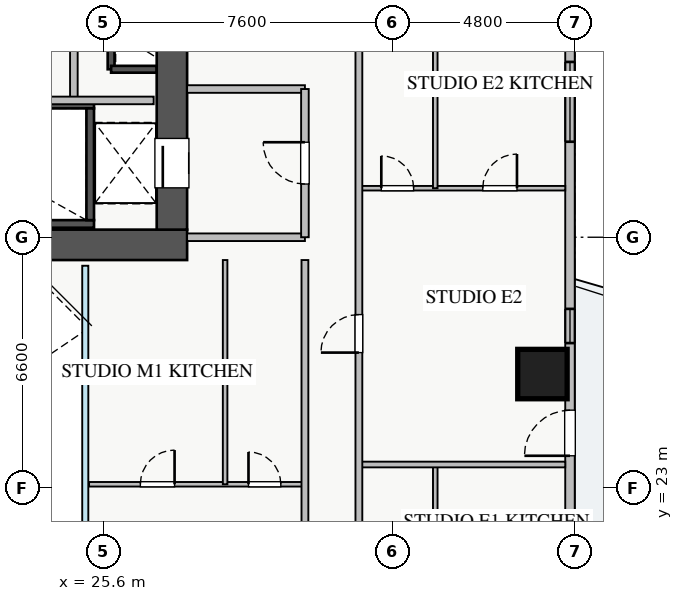
"""IFC4 building model, lengths in metres.
Left out: names, types, materials, properties, quantities, classifications, styles, units other than length and angle.
Written with IfcOpenShell. Run it as: python <this file> out.ifc"""

import sys

from ifc_helpers import new_model, si_unit, direction, frame, frame_2d, origin, origin_2d, place, context, subcontext, project, spatial, rectangle, extrude, source, transform, mapped, element, fill, save


model = new_model("IFC4")
c1 = context("Model", 3, precision=1e-05, world=origin(), true_north=direction((0.0, 1.0)))
c2 = subcontext(c1, "Body", "Model", "MODEL_VIEW")
j1 = project(units=[si_unit("LENGTHUNIT", "METRE"), si_unit("PLANEANGLEUNIT", "RADIAN")], contexts=[c1])
p1 = place(None, origin())
s1 = spatial("IfcSite", under=j1, at=p1, CompositionType="ELEMENT")
p2 = place(p1, origin())
s2 = spatial("IfcBuilding", under=s1, at=p2, CompositionType="ELEMENT")
p3 = place(p2, frame((0.0, 0.0, 69.75)))
s3 = spatial("IfcBuildingStorey", under=s2, at=p3, CompositionType="ELEMENT", Elevation=69.75)
p4 = place(p3, frame((25.8, 34.02, 0.0), z_axis=(0.0, 0.0, 1.0), x_axis=(0.0, 1.0, 0.0)))
e1 = element("IfcWall", 1, at=p4, inside=s3, PredefinedType="SHEAR", context=c2, shape_type="SweptSolid", body=[
    extrude(rectangle(XDim=1.06, YDim=0.18, at=frame_2d((0.53, 0.0))), origin(), (0.0, 0.0, 1.0), 3.07),
])
p5 = place(p3, frame((25.8, 34.02, 0.0), z_axis=(0.0, 0.0, 1.0), x_axis=(1.0, 0.0, 0.0)))
e2 = element("IfcWall", 2, at=p5, inside=s3, PredefinedType="SHEAR", context=c2, shape_type="SweptSolid", body=[
    extrude(rectangle(XDim=1.2, YDim=0.18, at=frame_2d((0.6, 0.0))), origin(), (0.0, 0.0, 1.0), 3.07),
])
p6 = place(p3, frame((18.2, 29.95, 0.0), z_axis=(0.0, 0.0, 1.0), x_axis=(1.0, 0.0, 0.0)))
e3 = element("IfcWall", 3, at=p6, inside=s3, PredefinedType="SHEAR", context=c2, shape_type="SweptSolid", body=[
    extrude(rectangle(XDim=7.15, YDim=0.2, at=frame_2d((3.575, 0.0))), origin(), (0.0, 0.0, 1.0), 3.25),
])
p7 = place(p3, frame((18.2, 33.09, 0.0), z_axis=(0.0, 0.0, 1.0), x_axis=(1.0, 0.0, 0.0)))
e4 = element("IfcWall", 4, at=p7, inside=s3, PredefinedType="SHEAR", context=c2, shape_type="SweptSolid", body=[
    extrude(rectangle(XDim=7.15, YDim=0.2, at=frame_2d((3.575, 0.0))), origin(), (0.0, 0.0, 1.0), 3.25),
])
p8 = place(p7, frame((0.35, 0.0, 0.0)))
e5 = element("IfcOpeningElement", 5, at=p8, cuts=e4, PredefinedType="OPENING", context=c2, shape_type="SweptSolid", body=[
    extrude(rectangle(XDim=1.1, YDim=2.05, at=frame_2d((0.55, 1.025))), frame((0.0, 0.11, 0.0), z_axis=(0.0, -1.0, 0.0), x_axis=(1.0, 0.0, 0.0)), (0.0, 0.0, 1.0), 0.22),
])
p9 = place(p3, frame((25.25, 30.05, 0.0), z_axis=(0.0, 0.0, 1.0), x_axis=(0.0, 1.0, 0.0)))
e6 = element("IfcWall", 6, at=p9, inside=s3, PredefinedType="SHEAR", context=c2, shape_type="SweptSolid", body=[
    extrude(rectangle(XDim=2.94, YDim=0.2, at=frame_2d((1.47, 0.0))), origin(), (0.0, 0.0, 1.0), 3.25),
])
p10 = place(p3, frame((10.2, 29.4, 0.0), z_axis=(0.0, 0.0, 1.0), x_axis=(1.0, 0.0, 0.0)))
e7 = element("IfcWall", 7, at=p10, inside=s3, PredefinedType="SHEAR", context=c2, shape_type="SweptSolid", body=[
    extrude(rectangle(XDim=17.6, YDim=0.8, at=frame_2d((8.8, 0.0))), origin(), (0.0, 0.0, 1.0), 3.25),
])
p11 = place(p3, frame((27.4, 29.8, 0.0), z_axis=(0.0, 0.0, 1.0), x_axis=(0.0, 1.0, 0.0)))
e8 = element("IfcWall", 8, at=p11, inside=s3, PredefinedType="SHEAR", context=c2, shape_type="SweptSolid", body=[
    extrude(rectangle(XDim=5.6, YDim=0.8, at=frame_2d((2.8, 0.0))), origin(), (0.0, 0.0, 1.0), 3.25),
])
p12 = place(p11, frame((1.1, 0.0, 0.0)))
e9 = element("IfcOpeningElement", 9, at=p12, cuts=e8, PredefinedType="OPENING", context=c2, shape_type="SweptSolid", body=[
    extrude(rectangle(XDim=1.3, YDim=2.05, at=frame_2d((0.65, 1.025))), frame((0.0, 0.41, 0.0), z_axis=(0.0, -1.0, 0.0), x_axis=(1.0, 0.0, 0.0)), (0.0, 0.0, 1.0), 0.82),
])
m1 = source(origin(), c2, "Body", "SweptSolid", [
    extrude(rectangle(XDim=1.3, YDim=1.3, at=origin_2d()), origin(), (0.0, 0.0, 1.0), 3.25),
])
p13 = place(p3, frame((37.15, 26.0, 0.0), z_axis=(0.0, 0.0, 1.0), x_axis=(1.0, 0.0, 0.0)))
e10 = element("IfcColumn", 10, at=p13, inside=s3, PredefinedType="COLUMN", context=c2, shape_type="MappedRepresentation", body=[
    mapped(m1, transform((0.0, 0.0, 0.0), x_axis=(1.0, 0.0, 0.0), y_axis=(0.0, 1.0, 0.0), z_axis=(0.0, 0.0, 1.0), scale=1.0)),
])
p14 = place(p3, frame((37.875, 9.45, 0.0), z_axis=(0.0, 0.0, 1.0), x_axis=(0.0, 1.0, 0.0)))
e11 = element("IfcWall", 11, at=p14, inside=s3, PredefinedType="STANDARD", context=c2, shape_type="SweptSolid", body=[
    extrude(rectangle(XDim=27.1, YDim=0.25, at=frame_2d((13.55, 0.0))), origin(), (0.0, 0.0, 1.0), 2.61),
])
p15 = place(p14, frame((14.4, 0.0, 0.0)))
e12 = element("IfcOpeningElement", 12, at=p15, cuts=e11, PredefinedType="OPENING", context=c2, shape_type="SweptSolid", body=[
    extrude(rectangle(XDim=1.2, YDim=2.1, at=frame_2d((0.6, 1.05))), frame((0.0, 0.135, 0.0), z_axis=(0.0, -1.0, 0.0), x_axis=(1.0, 0.0, 0.0)), (0.0, 0.0, 1.0), 0.27),
])
p16 = place(p14, frame((2.188, 0.0, 0.9)))
e13 = element("IfcOpeningElement", 13, at=p16, cuts=e11, PredefinedType="OPENING", context=c2, shape_type="SweptSolid", body=[
    extrude(rectangle(XDim=2.4, YDim=1.48, at=frame_2d((1.2, 0.74))), frame((0.0, 0.135, 0.0), z_axis=(0.0, -1.0, 0.0), x_axis=(1.0, 0.0, 0.0)), (0.0, 0.0, 1.0), 0.27),
])
p17 = place(p14, frame((22.663, 0.0, 0.9)))
e14 = element("IfcOpeningElement", 14, at=p17, cuts=e11, PredefinedType="OPENING", context=c2, shape_type="SweptSolid", body=[
    extrude(rectangle(XDim=2.1, YDim=1.48, at=frame_2d((1.05, 0.74))), frame((0.0, 0.135, 0.0), z_axis=(0.0, -1.0, 0.0), x_axis=(1.0, 0.0, 0.0)), (0.0, 0.0, 1.0), 0.27),
])
p18 = place(p14, frame((17.365, 0.0, 0.9)))
e15 = element("IfcOpeningElement", 15, at=p18, cuts=e11, PredefinedType="OPENING", context=c2, shape_type="SweptSolid", body=[
    extrude(rectangle(XDim=0.9, YDim=1.2, at=frame_2d((0.45, 0.6))), frame((0.0, 0.135, 0.0), z_axis=(0.0, -1.0, 0.0), x_axis=(1.0, 0.0, 0.0)), (0.0, 0.0, 1.0), 0.27),
])
for number, where, z_axis, x_axis in (
    (16, (27.8, 29.6, 0.0), (0.0, 0.0, 1.0), (1.0, 0.0, 0.0)),
    (17, (27.8, 33.5, 0.0), (0.0, 0.0, 1.0), (1.0, 0.0, 0.0)),
):
    element("IfcWall", number, at=place(p3, frame(where, z_axis=z_axis, x_axis=x_axis)), inside=s3, PredefinedType="PARTITIONING", context=c2, shape_type="SweptSolid", body=[
        extrude(rectangle(XDim=3.1, YDim=0.2, at=frame_2d((1.55, 0.0))), origin(), (0.0, 0.0, 1.0), 3.07),
    ])
p19 = place(p3, frame((30.9, 29.6, 0.0), z_axis=(0.0, 0.0, 1.0), x_axis=(0.0, 1.0, 0.0)))
e18 = element("IfcWall", 18, at=p19, inside=s3, PredefinedType="PARTITIONING", context=c2, shape_type="SweptSolid", body=[
    extrude(rectangle(XDim=3.9, YDim=0.2, at=frame_2d((1.95, 0.0))), origin(), (0.0, 0.0, 1.0), 3.07),
])
p20 = place(p19, frame((1.4, 0.0, 0.0)))
e19 = element("IfcOpeningElement", 19, at=p20, cuts=e18, PredefinedType="OPENING", context=c2, shape_type="SweptSolid", body=[
    extrude(rectangle(XDim=1.1, YDim=2.05, at=frame_2d((0.55, 1.025))), frame((0.0, 0.11, 0.0), z_axis=(0.0, -1.0, 0.0), x_axis=(1.0, 0.0, 0.0)), (0.0, 0.0, 1.0), 0.22),
])
p21 = place(p3, frame((24.82, 33.2, 0.0), z_axis=(0.0, 0.0, 1.0), x_axis=(0.0, 1.0, 0.0)))
e20 = element("IfcWall", 20, at=p21, inside=s3, PredefinedType="PARTITIONING", context=c2, shape_type="SweptSolid", body=[
    extrude(rectangle(XDim=2.65, YDim=0.2, at=frame_2d((1.325, 0.0))), origin(), (0.0, 0.0, 1.0), 3.07),
])
p22 = place(p3, frame((21.75, 33.2, 0.0), z_axis=(0.0, 0.0, 1.0), x_axis=(1.0, 0.0, 0.0)))
e21 = element("IfcWall", 21, at=p22, inside=s3, PredefinedType="PARTITIONING", context=c2, shape_type="SweptSolid", body=[
    extrude(rectangle(XDim=5.17, YDim=0.2, at=frame_2d((2.585, 0.0))), origin(), (0.0, 0.0, 1.0), 3.07),
])
p23 = place(p3, frame((34.33, 16.86, 0.0), z_axis=(0.0, 0.0, 1.0), x_axis=(0.0, 1.0, 0.0)))
e22 = element("IfcWall", 22, at=p23, inside=s3, PredefinedType="PLUMBINGWALL", context=c2, shape_type="SweptSolid", body=[
    extrude(rectangle(XDim=6.76, YDim=0.12, at=frame_2d((3.38, 0.0))), origin(), (0.0, 0.0, 1.0), 3.07),
])
p24 = place(p3, frame((32.32, 30.89, 0.0), z_axis=(0.0, 0.0, 1.0), x_axis=(1.0, 0.0, 0.0)))
e23 = element("IfcWall", 23, at=p24, inside=s3, PredefinedType="PLUMBINGWALL", context=c2, shape_type="SweptSolid", body=[
    extrude(rectangle(XDim=5.43, YDim=0.12, at=frame_2d((2.715, 0.0))), origin(), (0.0, 0.0, 1.0), 3.07),
])
p25 = place(p24, frame((0.59, 0.0, 0.0)))
e24 = element("IfcOpeningElement", 24, at=p25, cuts=e23, PredefinedType="OPENING", context=c2, shape_type="SweptSolid", body=[
    extrude(rectangle(XDim=0.85, YDim=2.05, at=frame_2d((0.425, 1.025))), frame((0.0, 0.07, 0.0), z_axis=(0.0, -1.0, 0.0), x_axis=(1.0, 0.0, 0.0)), (0.0, 0.0, 1.0), 0.14),
])
p26 = place(p24, frame((3.26, 0.0, 0.0)))
e25 = element("IfcOpeningElement", 25, at=p26, cuts=e23, PredefinedType="OPENING", context=c2, shape_type="SweptSolid", body=[
    extrude(rectangle(XDim=0.9, YDim=2.05, at=frame_2d((0.45, 1.025))), frame((0.0, 0.07, 0.0), z_axis=(0.0, -1.0, 0.0), x_axis=(1.0, 0.0, 0.0)), (0.0, 0.0, 1.0), 0.14),
])
p27 = place(p3, frame((34.33, 30.89, 0.0), z_axis=(0.0, 0.0, 1.0), x_axis=(0.0, 1.0, 0.0)))
e26 = element("IfcWall", 26, at=p27, inside=s3, PredefinedType="PLUMBINGWALL", context=c2, shape_type="SweptSolid", body=[
    extrude(rectangle(XDim=6.19, YDim=0.12, at=frame_2d((3.095, 0.0))), origin(), (0.0, 0.0, 1.0), 3.07),
])
p28 = place(p3, frame((32.32, 23.62, 0.0), z_axis=(0.0, 0.0, 1.0), x_axis=(1.0, 0.0, 0.0)))
e27 = element("IfcWall", 27, at=p28, inside=s3, PredefinedType="PARTITIONING", context=c2, shape_type="SweptSolid", body=[
    extrude(rectangle(XDim=5.43, YDim=0.15, at=frame_2d((2.715, 0.0))), origin(), (0.0, 0.0, 1.0), 3.07),
])
p29 = place(p3, frame((32.32, 7.21, 0.0), z_axis=(0.0, 0.0, 1.0), x_axis=(0.0, 1.0, 0.0)))
e28 = element("IfcWall", 28, at=p29, inside=s3, PredefinedType="PARTITIONING", context=c2, shape_type="SweptSolid", body=[
    extrude(rectangle(XDim=31.23, YDim=0.18, at=frame_2d((15.615, 0.0))), origin(), (0.0, 0.0, 1.0), 2.765),
])
p30 = place(p29, frame((30.09, 0.0, 0.0)))
e29 = element("IfcOpeningElement", 29, at=p30, cuts=e28, PredefinedType="OPENING", context=c2, shape_type="SweptSolid", body=[
    extrude(rectangle(XDim=0.9, YDim=2.05, at=frame_2d((0.45, 1.025))), frame((0.0, 0.1, 0.0), z_axis=(0.0, -1.0, 0.0), x_axis=(1.0, 0.0, 0.0)), (0.0, 0.0, 1.0), 0.2),
])
p31 = place(p29, frame((0.415, 0.0, 0.0)))
e30 = element("IfcOpeningElement", 30, at=p31, cuts=e28, PredefinedType="OPENING", context=c2, shape_type="SweptSolid", body=[
    extrude(rectangle(XDim=0.9, YDim=2.05, at=frame_2d((0.45, 1.025))), frame((0.0, 0.1, 0.0), z_axis=(0.0, -1.0, 0.0), x_axis=(1.0, 0.0, 0.0)), (0.0, 0.0, 1.0), 0.2),
])
p32 = place(p29, frame((4.99, 0.0, 0.0)))
e31 = element("IfcOpeningElement", 31, at=p32, cuts=e28, PredefinedType="OPENING", context=c2, shape_type="SweptSolid", body=[
    extrude(rectangle(XDim=1.0, YDim=2.05, at=frame_2d((0.5, 1.025))), frame((0.0, 0.1, 0.0), z_axis=(0.0, -1.0, 0.0), x_axis=(1.0, 0.0, 0.0)), (0.0, 0.0, 1.0), 0.2),
])
p33 = place(p29, frame((19.355, 0.0, 0.0)))
e32 = element("IfcOpeningElement", 32, at=p33, cuts=e28, PredefinedType="OPENING", context=c2, shape_type="SweptSolid", body=[
    extrude(rectangle(XDim=1.0, YDim=2.05, at=frame_2d((0.5, 1.025))), frame((0.0, 0.1, 0.0), z_axis=(0.0, -1.0, 0.0), x_axis=(1.0, 0.0, 0.0)), (0.0, 0.0, 1.0), 0.2),
])
p34 = place(p3, frame((25.22, 23.1, 0.0), z_axis=(0.0, 0.0, 1.0), x_axis=(1.0, 0.0, 0.0)))
e33 = element("IfcWall", 33, at=p34, inside=s3, PredefinedType="PLUMBINGWALL", context=c2, shape_type="SweptSolid", body=[
    extrude(rectangle(XDim=5.68, YDim=0.12, at=frame_2d((2.84, 0.0))), origin(), (0.0, 0.0, 1.0), 3.07),
])
p35 = place(p34, frame((1.35, 0.0, 0.0)))
e34 = element("IfcOpeningElement", 34, at=p35, cuts=e33, PredefinedType="OPENING", context=c2, shape_type="SweptSolid", body=[
    extrude(rectangle(XDim=0.9, YDim=2.05, at=frame_2d((0.45, 1.025))), frame((0.0, 0.07, 0.0), z_axis=(0.0, -1.0, 0.0), x_axis=(1.0, 0.0, 0.0)), (0.0, 0.0, 1.0), 0.14),
])
p36 = place(p34, frame((4.195, 0.0, 0.0)))
e35 = element("IfcOpeningElement", 35, at=p36, cuts=e33, PredefinedType="OPENING", context=c2, shape_type="SweptSolid", body=[
    extrude(rectangle(XDim=0.85, YDim=2.05, at=frame_2d((0.425, 1.025))), frame((0.0, 0.07, 0.0), z_axis=(0.0, -1.0, 0.0), x_axis=(1.0, 0.0, 0.0)), (0.0, 0.0, 1.0), 0.14),
])
p37 = place(p3, frame((28.8, 23.1, 0.0), z_axis=(0.0, 0.0, 1.0), x_axis=(0.0, 1.0, 0.0)))
e36 = element("IfcWall", 36, at=p37, inside=s3, PredefinedType="PLUMBINGWALL", context=c2, shape_type="SweptSolid", body=[
    extrude(rectangle(XDim=5.9, YDim=0.12, at=frame_2d((2.95, 0.0))), origin(), (0.0, 0.0, 1.0), 3.07),
])
p38 = place(p3, frame((30.9, 17.0, 0.0), z_axis=(0.0, 0.0, 1.0), x_axis=(0.0, 1.0, 0.0)))
e37 = element("IfcWall", 37, at=p38, inside=s3, PredefinedType="PARTITIONING", context=c2, shape_type="SweptSolid", body=[
    extrude(rectangle(XDim=12.0, YDim=0.18, at=frame_2d((6.0, 0.0))), origin(), (0.0, 0.0, 1.0), 3.07),
])
p39 = place(p38, frame((2.36, 0.0, 0.0)))
e38 = element("IfcOpeningElement", 38, at=p39, cuts=e37, PredefinedType="OPENING", context=c2, shape_type="SweptSolid", body=[
    extrude(rectangle(XDim=1.0, YDim=2.05, at=frame_2d((0.5, 1.025))), frame((0.0, 0.1, 0.0), z_axis=(0.0, -1.0, 0.0), x_axis=(1.0, 0.0, 0.0)), (0.0, 0.0, 1.0), 0.2),
])
m2 = source(origin(), c2, "Body", "SweptSolid", [
    extrude(rectangle(XDim=1.2, YDim=2.1, at=frame_2d((0.6, 1.05))), frame((0.0, 0.025, 0.0), z_axis=(0.0, -1.0, 0.0), x_axis=(1.0, 0.0, 0.0)), (0.0, 0.0, 1.0), 0.05),
])
p40 = place(p15, origin())
e39 = element("IfcDoor", 39, at=p40, inside=s3, OperationType="SINGLE_SWING_LEFT", PredefinedType="DOOR", context=c2, shape_type="MappedRepresentation", body=[
    mapped(m2, transform((0.0, 0.0, 0.0), x_axis=(1.0, 0.0, 0.0), y_axis=(0.0, 1.0, 0.0), z_axis=(0.0, 0.0, 1.0), scale=1.0)),
])
fill(e12, e39)
m3 = source(origin(), c2, "Body", "SweptSolid", [
    extrude(rectangle(XDim=2.1, YDim=1.48, at=frame_2d((1.05, 0.74))), frame((0.0, 0.03, 0.0), z_axis=(0.0, -1.0, 0.0), x_axis=(1.0, 0.0, 0.0)), (0.0, 0.0, 1.0), 0.06),
])
p41 = place(p17, origin())
e40 = element("IfcWindow", 40, at=p41, inside=s3, PartitioningType="TRIPLE_PANEL_VERTICAL", PredefinedType="WINDOW", context=c2, shape_type="MappedRepresentation", body=[
    mapped(m3, transform((0.0, 0.0, 0.0), x_axis=(1.0, 0.0, 0.0), y_axis=(0.0, 1.0, 0.0), z_axis=(0.0, 0.0, 1.0), scale=1.0)),
])
fill(e14, e40)
m4 = source(origin(), c2, "Body", "SweptSolid", [
    extrude(rectangle(XDim=1.3, YDim=2.05, at=frame_2d((0.65, 1.025))), frame((0.0, 0.025, 0.0), z_axis=(0.0, -1.0, 0.0), x_axis=(1.0, 0.0, 0.0)), (0.0, 0.0, 1.0), 0.05),
])
p42 = place(p12, origin())
e41 = element("IfcDoor", 41, at=p42, inside=s3, OperationType="SLIDING_TO_LEFT", PredefinedType="DOOR", context=c2, shape_type="MappedRepresentation", body=[
    mapped(m4, transform((0.0, 0.0, 0.0), x_axis=(1.0, 0.0, 0.0), y_axis=(0.0, 1.0, 0.0), z_axis=(0.0, 0.0, 1.0), scale=1.0)),
])
fill(e9, e41)
m5 = source(origin(), c2, "Body", "SweptSolid", [
    extrude(rectangle(XDim=1.1, YDim=2.05, at=frame_2d((0.55, 1.025))), frame((0.0, 0.025, 0.0), z_axis=(0.0, -1.0, 0.0), x_axis=(1.0, 0.0, 0.0)), (0.0, 0.0, 1.0), 0.05),
])
p43 = place(p20, origin())
e42 = element("IfcDoor", 42, at=p43, inside=s3, OperationType="SINGLE_SWING_RIGHT", PredefinedType="DOOR", context=c2, shape_type="MappedRepresentation", body=[
    mapped(m5, transform((0.0, 0.0, 0.0), x_axis=(1.0, 0.0, 0.0), y_axis=(0.0, 1.0, 0.0), z_axis=(0.0, 0.0, 1.0), scale=1.0)),
])
fill(e19, e42)
m6 = source(origin(), c2, "Body", "SweptSolid", [
    extrude(rectangle(XDim=0.85, YDim=2.05, at=frame_2d((0.425, 1.025))), frame((0.0, 0.025, 0.0), z_axis=(0.0, -1.0, 0.0), x_axis=(1.0, 0.0, 0.0)), (0.0, 0.0, 1.0), 0.05),
])
p44 = place(p25, origin())
e43 = element("IfcDoor", 43, at=p44, inside=s3, OperationType="SINGLE_SWING_LEFT", PredefinedType="DOOR", context=c2, shape_type="MappedRepresentation", body=[
    mapped(m6, transform((0.0, 0.0, 0.0), x_axis=(1.0, 0.0, 0.0), y_axis=(0.0, 1.0, 0.0), z_axis=(0.0, 0.0, 1.0), scale=1.0)),
])
fill(e24, e43)
m7 = source(origin(), c2, "Body", "SweptSolid", [
    extrude(rectangle(XDim=0.9, YDim=2.05, at=frame_2d((0.45, 1.025))), frame((0.0, 0.025, 0.0), z_axis=(0.0, -1.0, 0.0), x_axis=(1.0, 0.0, 0.0)), (0.0, 0.0, 1.0), 0.05),
])
p45 = place(p26, origin())
e44 = element("IfcDoor", 44, at=p45, inside=s3, OperationType="SINGLE_SWING_RIGHT", PredefinedType="DOOR", context=c2, shape_type="MappedRepresentation", body=[
    mapped(m7, transform((0.0, 0.0, 0.0), x_axis=(1.0, 0.0, 0.0), y_axis=(0.0, 1.0, 0.0), z_axis=(0.0, 0.0, 1.0), scale=1.0)),
])
fill(e25, e44)
m8 = source(origin(), c2, "Body", "SweptSolid", [
    extrude(rectangle(XDim=1.0, YDim=2.05, at=frame_2d((0.5, 1.025))), frame((0.0, 0.025, 0.0), z_axis=(0.0, -1.0, 0.0), x_axis=(1.0, 0.0, 0.0)), (0.0, 0.0, 1.0), 0.05),
])
p46 = place(p33, origin())
e45 = element("IfcDoor", 45, at=p46, inside=s3, OperationType="SINGLE_SWING_LEFT", PredefinedType="DOOR", context=c2, shape_type="MappedRepresentation", body=[
    mapped(m8, transform((0.0, 0.0, 0.0), x_axis=(1.0, 0.0, 0.0), y_axis=(0.0, 1.0, 0.0), z_axis=(0.0, 0.0, 1.0), scale=1.0)),
])
fill(e32, e45)
p47 = place(p35, origin())
e46 = element("IfcDoor", 46, at=p47, inside=s3, OperationType="SINGLE_SWING_RIGHT", PredefinedType="DOOR", context=c2, shape_type="MappedRepresentation", body=[
    mapped(m7, transform((0.0, 0.0, 0.0), x_axis=(1.0, 0.0, 0.0), y_axis=(0.0, 1.0, 0.0), z_axis=(0.0, 0.0, 1.0), scale=1.0)),
])
fill(e34, e46)
p48 = place(p36, origin())
e47 = element("IfcDoor", 47, at=p48, inside=s3, OperationType="SINGLE_SWING_LEFT", PredefinedType="DOOR", context=c2, shape_type="MappedRepresentation", body=[
    mapped(m6, transform((0.0, 0.0, 0.0), x_axis=(1.0, 0.0, 0.0), y_axis=(0.0, 1.0, 0.0), z_axis=(0.0, 0.0, 1.0), scale=1.0)),
])
fill(e35, e47)
m9 = source(origin(), c2, "Body", "SweptSolid", [
    extrude(rectangle(XDim=0.9, YDim=1.2, at=frame_2d((0.45, 0.6))), frame((0.0, 0.03, 0.0), z_axis=(0.0, -1.0, 0.0), x_axis=(1.0, 0.0, 0.0)), (0.0, 0.0, 1.0), 0.06),
])
p49 = place(p18, origin())
e48 = element("IfcWindow", 48, at=p49, inside=s3, PartitioningType="SINGLE_PANEL", PredefinedType="WINDOW", context=c2, shape_type="MappedRepresentation", body=[
    mapped(m9, transform((0.0, 0.0, 0.0), x_axis=(1.0, 0.0, 0.0), y_axis=(0.0, 1.0, 0.0), z_axis=(0.0, 0.0, 1.0), scale=1.0)),
])
fill(e15, e48)
save(model, sys.argv[1])
